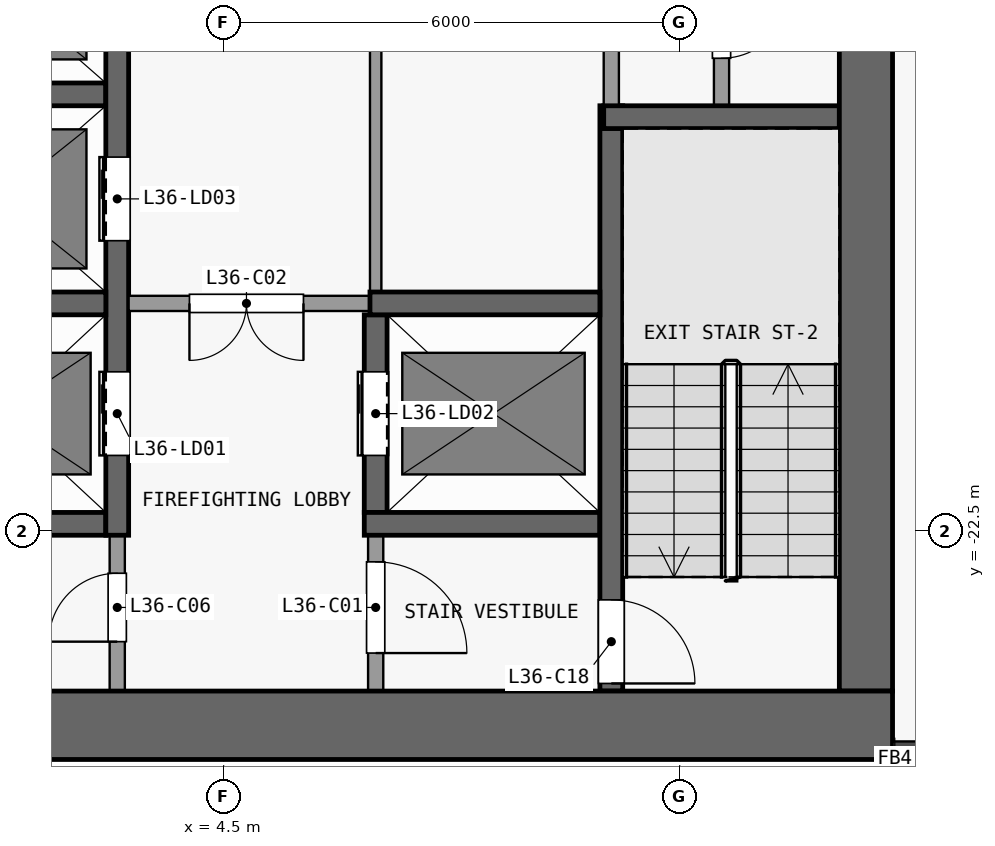
"""IFC4 building model, lengths in metres.
Left out: names, types, materials, properties, quantities, classifications, styles, units other than length and angle.
Written with IfcOpenShell. Run it as: python <this file> out.ifc"""

import sys

from ifc_helpers import new_model, si_unit, direction, frame, frame_2d, origin, place, context, subcontext, project, spatial, rectangle, extrude, element, fill, save


model = new_model("IFC4")
c1 = context("Model", 3, precision=1e-05, world=origin(), true_north=direction((0.0, 1.0)))
c2 = subcontext(c1, "Body", "Model", "MODEL_VIEW")
j1 = project(units=[si_unit("LENGTHUNIT", "METRE"), si_unit("PLANEANGLEUNIT", "RADIAN")], contexts=[c1])
p1 = place(None, origin())
s1 = spatial("IfcSite", under=j1, at=p1, CompositionType="ELEMENT")
p2 = place(p1, origin())
s2 = spatial("IfcBuilding", under=s1, at=p2, CompositionType="ELEMENT")
p3 = place(p2, frame((0.0, 0.0, 149.3)))
s3 = spatial("IfcBuildingStorey", under=s2, at=p3, CompositionType="ELEMENT", Elevation=149.3)
p4 = place(p3, frame((-13.3, -25.05, 0.0), z_axis=(0.0, 0.0, 1.0), x_axis=(1.0, 0.0, 0.0)))
e1 = element("IfcWall", 1, at=p4, inside=s3, PredefinedType="SHEAR", context=c2, shape_type="SweptSolid", body=[
    extrude(rectangle(XDim=26.6, YDim=0.9, at=frame_2d((13.3, 0.0))), origin(), (0.0, 0.0, 1.0), 3.3),
])
p5 = place(p3, frame((12.95, -24.6, 0.0), z_axis=(0.0, 0.0, 1.0), x_axis=(0.0, 1.0, 0.0)))
e2 = element("IfcWall", 2, at=p5, inside=s3, PredefinedType="SHEAR", context=c2, shape_type="SweptSolid", body=[
    extrude(rectangle(XDim=16.1, YDim=0.7, at=frame_2d((8.05, 0.0))), origin(), (0.0, 0.0, 1.0), 3.3),
])
p6 = place(p3, frame((-3.25, -22.4, 0.0), z_axis=(0.0, 0.0, 1.0), x_axis=(1.0, 0.0, 0.0)))
e3 = element("IfcWall", 3, at=p6, inside=s3, PredefinedType="SHEAR", context=c2, shape_type="SweptSolid", body=[
    extrude(rectangle(XDim=6.2, YDim=0.3, at=frame_2d((3.1, 0.0))), origin(), (0.0, 0.0, 1.0), 3.3),
])
p7 = place(p3, frame((6.35, -22.4, 0.0), z_axis=(0.0, 0.0, 1.0), x_axis=(1.0, 0.0, 0.0)))
e4 = element("IfcWall", 4, at=p7, inside=s3, PredefinedType="SHEAR", context=c2, shape_type="SweptSolid", body=[
    extrude(rectangle(XDim=3.1, YDim=0.3, at=frame_2d((1.55, 0.0))), origin(), (0.0, 0.0, 1.0), 3.3),
])
p8 = place(p3, frame((0.15, -19.5, 0.0), z_axis=(0.0, 0.0, 1.0), x_axis=(1.0, 0.0, 0.0)))
e5 = element("IfcWall", 5, at=p8, inside=s3, PredefinedType="SHEAR", context=c2, shape_type="SweptSolid", body=[
    extrude(rectangle(XDim=2.8, YDim=0.3, at=frame_2d((1.4, 0.0))), origin(), (0.0, 0.0, 1.0), 3.3),
])
p9 = place(p3, frame((6.575, -19.5, 0.0), z_axis=(0.0, 0.0, 1.0), x_axis=(-1.0, 0.0, 0.0)))
e6 = element("IfcWall", 6, at=p9, inside=s3, PredefinedType="PARTITIONING", context=c2, shape_type="SweptSolid", body=[
    extrude(rectangle(XDim=3.325, YDim=0.2, at=frame_2d((1.663, 0.0))), origin(), (0.0, 0.0, 1.0), 3.3),
])
p10 = place(p9, frame((1.025, 0.0, 0.0)))
e7 = element("IfcOpeningElement", 7, at=p10, cuts=e6, PredefinedType="OPENING", context=c2, shape_type="SweptSolid", body=[
    extrude(rectangle(XDim=1.5, YDim=2.1, at=frame_2d((0.75, 1.05))), frame((0.0, 0.11, 0.0), z_axis=(0.0, -1.0, 0.0), x_axis=(1.0, 0.0, 0.0)), (0.0, 0.0, 1.0), 0.22),
])
p11 = place(p3, frame((6.425, -19.5, 0.0), z_axis=(0.0, 0.0, 1.0), x_axis=(1.0, 0.0, 0.0)))
e8 = element("IfcWall", 8, at=p11, inside=s3, PredefinedType="SHEAR", context=c2, shape_type="SweptSolid", body=[
    extrude(rectangle(XDim=3.025, YDim=0.3, at=frame_2d((1.512, 0.0))), origin(), (0.0, 0.0, 1.0), 3.3),
])
p12 = place(p3, frame((9.5, -17.05, 0.0), z_axis=(0.0, 0.0, 1.0), x_axis=(1.0, 0.0, 0.0)))
e9 = element("IfcWall", 9, at=p12, inside=s3, PredefinedType="SHEAR", context=c2, shape_type="SweptSolid", body=[
    extrude(rectangle(XDim=3.1, YDim=0.3, at=frame_2d((1.55, 0.0))), origin(), (0.0, 0.0, 1.0), 3.3),
])
p13 = place(p3, frame((0.15, -16.75, 0.0), z_axis=(0.0, 0.0, 1.0), x_axis=(1.0, 0.0, 0.0)))
e10 = element("IfcWall", 10, at=p13, inside=s3, PredefinedType="SHEAR", context=c2, shape_type="SweptSolid", body=[
    extrude(rectangle(XDim=2.8, YDim=0.3, at=frame_2d((1.4, 0.0))), origin(), (0.0, 0.0, 1.0), 3.3),
])
p14 = place(p3, frame((3.1, -24.6, 0.0), z_axis=(0.0, 0.0, 1.0), x_axis=(0.0, 1.0, 0.0)))
e11 = element("IfcWall", 11, at=p14, inside=s3, PredefinedType="PARTITIONING", context=c2, shape_type="SweptSolid", body=[
    extrude(rectangle(XDim=2.05, YDim=0.2, at=frame_2d((1.025, 0.0))), origin(), (0.0, 0.0, 1.0), 3.3),
])
p15 = place(p14, frame((0.65, 0.0, 0.0)))
e12 = element("IfcOpeningElement", 12, at=p15, cuts=e11, PredefinedType="OPENING", context=c2, shape_type="SweptSolid", body=[
    extrude(rectangle(XDim=0.9, YDim=2.1, at=frame_2d((0.45, 1.05))), frame((0.0, 0.11, 0.0), z_axis=(0.0, -1.0, 0.0), x_axis=(1.0, 0.0, 0.0)), (0.0, 0.0, 1.0), 0.22),
])
p16 = place(p3, frame((3.1, -22.55, 0.0), z_axis=(0.0, 0.0, 1.0), x_axis=(0.0, 1.0, 0.0)))
e13 = element("IfcWall", 13, at=p16, inside=s3, PredefinedType="SHEAR", context=c2, shape_type="SweptSolid", body=[
    extrude(rectangle(XDim=14.05, YDim=0.3, at=frame_2d((7.025, 0.0))), origin(), (0.0, 0.0, 1.0), 3.3),
])
p17 = place(p16, frame((1.05, 0.0, 0.0)))
e14 = element("IfcOpeningElement", 14, at=p17, cuts=e13, PredefinedType="OPENING", context=c2, shape_type="SweptSolid", body=[
    extrude(rectangle(XDim=1.1, YDim=2.1, at=frame_2d((0.55, 1.05))), frame((0.0, 0.16, 0.0), z_axis=(0.0, -1.0, 0.0), x_axis=(1.0, 0.0, 0.0)), (0.0, 0.0, 1.0), 0.32),
])
p18 = place(p16, frame((3.875, 0.0, 0.0)))
e15 = element("IfcOpeningElement", 15, at=p18, cuts=e13, PredefinedType="OPENING", context=c2, shape_type="SweptSolid", body=[
    extrude(rectangle(XDim=1.1, YDim=2.1, at=frame_2d((0.55, 1.05))), frame((0.0, 0.16, 0.0), z_axis=(0.0, -1.0, 0.0), x_axis=(1.0, 0.0, 0.0)), (0.0, 0.0, 1.0), 0.32),
])
p19 = place(p16, frame((6.625, 0.0, 0.0)))
e16 = element("IfcOpeningElement", 16, at=p19, cuts=e13, PredefinedType="OPENING", context=c2, shape_type="SweptSolid", body=[
    extrude(rectangle(XDim=1.1, YDim=2.1, at=frame_2d((0.55, 1.05))), frame((0.0, 0.16, 0.0), z_axis=(0.0, -1.0, 0.0), x_axis=(1.0, 0.0, 0.0)), (0.0, 0.0, 1.0), 0.32),
])
p20 = place(p16, frame((9.375, 0.0, 0.0)))
e17 = element("IfcOpeningElement", 17, at=p20, cuts=e13, PredefinedType="OPENING", context=c2, shape_type="SweptSolid", body=[
    extrude(rectangle(XDim=1.1, YDim=2.1, at=frame_2d((0.55, 1.05))), frame((0.0, 0.16, 0.0), z_axis=(0.0, -1.0, 0.0), x_axis=(1.0, 0.0, 0.0)), (0.0, 0.0, 1.0), 0.32),
])
p21 = place(p16, frame((12.125, 0.0, 0.0)))
e18 = element("IfcOpeningElement", 18, at=p21, cuts=e13, PredefinedType="OPENING", context=c2, shape_type="SweptSolid", body=[
    extrude(rectangle(XDim=1.1, YDim=2.1, at=frame_2d((0.55, 1.05))), frame((0.0, 0.16, 0.0), z_axis=(0.0, -1.0, 0.0), x_axis=(1.0, 0.0, 0.0)), (0.0, 0.0, 1.0), 0.32),
])
p22 = place(p3, frame((6.5, -22.55, 0.0), z_axis=(0.0, 0.0, 1.0), x_axis=(0.0, -1.0, 0.0)))
e19 = element("IfcWall", 19, at=p22, inside=s3, PredefinedType="PARTITIONING", context=c2, shape_type="SweptSolid", body=[
    extrude(rectangle(XDim=2.05, YDim=0.2, at=frame_2d((1.025, 0.0))), origin(), (0.0, 0.0, 1.0), 3.3),
])
p23 = place(p22, frame((0.35, 0.0, 0.0)))
e20 = element("IfcOpeningElement", 20, at=p23, cuts=e19, PredefinedType="OPENING", context=c2, shape_type="SweptSolid", body=[
    extrude(rectangle(XDim=1.2, YDim=2.1, at=frame_2d((0.6, 1.05))), frame((0.0, 0.11, 0.0), z_axis=(0.0, -1.0, 0.0), x_axis=(1.0, 0.0, 0.0)), (0.0, 0.0, 1.0), 0.22),
])
p24 = place(p3, frame((6.5, -22.25, 0.0), z_axis=(0.0, 0.0, 1.0), x_axis=(0.0, 1.0, 0.0)))
e21 = element("IfcWall", 21, at=p24, inside=s3, PredefinedType="SHEAR", context=c2, shape_type="SweptSolid", body=[
    extrude(rectangle(XDim=2.6, YDim=0.3, at=frame_2d((1.3, 0.0))), origin(), (0.0, 0.0, 1.0), 3.3),
])
p25 = place(p24, frame((0.75, 0.0, 0.0)))
e22 = element("IfcOpeningElement", 22, at=p25, cuts=e21, PredefinedType="OPENING", context=c2, shape_type="SweptSolid", body=[
    extrude(rectangle(XDim=1.1, YDim=2.1, at=frame_2d((0.55, 1.05))), frame((0.0, 0.16, 0.0), z_axis=(0.0, -1.0, 0.0), x_axis=(1.0, 0.0, 0.0)), (0.0, 0.0, 1.0), 0.32),
])
p26 = place(p3, frame((6.5, -11.35, 0.0), z_axis=(0.0, 0.0, 1.0), x_axis=(0.0, -1.0, 0.0)))
e23 = element("IfcWall", 23, at=p26, inside=s3, PredefinedType="PARTITIONING", context=c2, shape_type="SweptSolid", body=[
    extrude(rectangle(XDim=8.0, YDim=0.15, at=frame_2d((4.0, 0.0))), origin(), (0.0, 0.0, 1.0), 3.3),
])
p27 = place(p26, frame((3.425, 0.0, 0.0)))
e24 = element("IfcOpeningElement", 24, at=p27, cuts=e23, PredefinedType="OPENING", context=c2, shape_type="SweptSolid", body=[
    extrude(rectangle(XDim=1.2, YDim=2.1, at=frame_2d((0.6, 1.05))), frame((0.0, 0.085, 0.0), z_axis=(0.0, -1.0, 0.0), x_axis=(1.0, 0.0, 0.0)), (0.0, 0.0, 1.0), 0.17),
])
p28 = place(p3, frame((9.6, -16.9, 0.0), z_axis=(0.0, 0.0, 1.0), x_axis=(0.0, -1.0, 0.0)))
e25 = element("IfcWall", 25, at=p28, inside=s3, PredefinedType="SHEAR", context=c2, shape_type="SweptSolid", body=[
    extrude(rectangle(XDim=7.7, YDim=0.3, at=frame_2d((3.85, 0.0))), origin(), (0.0, 0.0, 1.0), 3.3),
])
p29 = place(p28, frame((6.5, 0.0, 0.0)))
e26 = element("IfcOpeningElement", 26, at=p29, cuts=e25, PredefinedType="OPENING", context=c2, shape_type="SweptSolid", body=[
    extrude(rectangle(XDim=1.1, YDim=2.1, at=frame_2d((0.55, 1.05))), frame((0.0, 0.16, 0.0), z_axis=(0.0, -1.0, 0.0), x_axis=(1.0, 0.0, 0.0)), (0.0, 0.0, 1.0), 0.32),
])
p30 = place(p3, frame((9.6, -16.9, 0.0), z_axis=(0.0, 0.0, 1.0), x_axis=(0.0, 1.0, 0.0)))
e27 = element("IfcWall", 27, at=p30, inside=s3, PredefinedType="PARTITIONING", context=c2, shape_type="SweptSolid", body=[
    extrude(rectangle(XDim=5.75, YDim=0.2, at=frame_2d((2.875, 0.0))), origin(), (0.0, 0.0, 1.0), 3.3),
])
p31 = place(p3, frame((11.05, -14.5, 0.0), z_axis=(0.0, 0.0, 1.0), x_axis=(0.0, -1.0, 0.0)))
e28 = element("IfcWall", 28, at=p31, inside=s3, PredefinedType="PARTITIONING", context=c2, shape_type="SweptSolid", body=[
    extrude(rectangle(XDim=2.4, YDim=0.2, at=frame_2d((1.2, 0.0))), origin(), (0.0, 0.0, 1.0), 3.3),
])
p32 = place(p31, frame((0.875, 0.0, 0.0)))
e29 = element("IfcOpeningElement", 29, at=p32, cuts=e28, PredefinedType="OPENING", context=c2, shape_type="SweptSolid", body=[
    extrude(rectangle(XDim=0.9, YDim=2.1, at=frame_2d((0.45, 1.05))), frame((0.0, 0.11, 0.0), z_axis=(0.0, -1.0, 0.0), x_axis=(1.0, 0.0, 0.0)), (0.0, 0.0, 1.0), 0.22),
])
p33 = place(p17, origin())
e30 = element("IfcDoor", 30, at=p33, inside=s3, OperationType="DOUBLE_DOOR_SLIDING", PredefinedType="DOOR", context=c2, shape_type="SweptSolid", body=[
    extrude(rectangle(XDim=1.1, YDim=2.1, at=frame_2d((0.55, 1.05))), frame((0.0, 0.025, 0.0), z_axis=(0.0, -1.0, 0.0), x_axis=(1.0, 0.0, 0.0)), (0.0, 0.0, 1.0), 0.05),
])
fill(e14, e30)
p34 = place(p25, origin())
e31 = element("IfcDoor", 31, at=p34, inside=s3, OperationType="DOUBLE_DOOR_SLIDING", PredefinedType="DOOR", context=c2, shape_type="SweptSolid", body=[
    extrude(rectangle(XDim=1.1, YDim=2.1, at=frame_2d((0.55, 1.05))), frame((0.0, 0.025, 0.0), z_axis=(0.0, -1.0, 0.0), x_axis=(1.0, 0.0, 0.0)), (0.0, 0.0, 1.0), 0.05),
])
fill(e22, e31)
p35 = place(p18, origin())
e32 = element("IfcDoor", 32, at=p35, inside=s3, OperationType="DOUBLE_DOOR_SLIDING", PredefinedType="DOOR", context=c2, shape_type="SweptSolid", body=[
    extrude(rectangle(XDim=1.1, YDim=2.1, at=frame_2d((0.55, 1.05))), frame((0.0, 0.025, 0.0), z_axis=(0.0, -1.0, 0.0), x_axis=(1.0, 0.0, 0.0)), (0.0, 0.0, 1.0), 0.05),
])
fill(e15, e32)
p36 = place(p23, origin())
e33 = element("IfcDoor", 33, at=p36, inside=s3, OperationType="SINGLE_SWING_RIGHT", PredefinedType="DOOR", context=c2, shape_type="SweptSolid", body=[
    extrude(rectangle(XDim=1.2, YDim=2.1, at=frame_2d((0.6, 1.05))), frame((0.0, 0.025, 0.0), z_axis=(0.0, -1.0, 0.0), x_axis=(1.0, 0.0, 0.0)), (0.0, 0.0, 1.0), 0.05),
])
fill(e20, e33)
p37 = place(p10, origin())
e34 = element("IfcDoor", 34, at=p37, inside=s3, OperationType="DOUBLE_DOOR_SINGLE_SWING", PredefinedType="DOOR", context=c2, shape_type="SweptSolid", body=[
    extrude(rectangle(XDim=1.5, YDim=2.1, at=frame_2d((0.75, 1.05))), frame((0.0, 0.025, 0.0), z_axis=(0.0, -1.0, 0.0), x_axis=(1.0, 0.0, 0.0)), (0.0, 0.0, 1.0), 0.05),
])
fill(e7, e34)
p38 = place(p15, origin())
e35 = element("IfcDoor", 35, at=p38, inside=s3, OperationType="SINGLE_SWING_LEFT", PredefinedType="DOOR", context=c2, shape_type="SweptSolid", body=[
    extrude(rectangle(XDim=0.9, YDim=2.1, at=frame_2d((0.45, 1.05))), frame((0.0, 0.025, 0.0), z_axis=(0.0, -1.0, 0.0), x_axis=(1.0, 0.0, 0.0)), (0.0, 0.0, 1.0), 0.05),
])
fill(e12, e35)
p39 = place(p32, origin())
e36 = element("IfcDoor", 36, at=p39, inside=s3, OperationType="SINGLE_SWING_LEFT", PredefinedType="DOOR", context=c2, shape_type="SweptSolid", body=[
    extrude(rectangle(XDim=0.9, YDim=2.1, at=frame_2d((0.45, 1.05))), frame((0.0, 0.025, 0.0), z_axis=(0.0, -1.0, 0.0), x_axis=(1.0, 0.0, 0.0)), (0.0, 0.0, 1.0), 0.05),
])
fill(e29, e36)
p40 = place(p29, origin())
e37 = element("IfcDoor", 37, at=p40, inside=s3, OperationType="SINGLE_SWING_RIGHT", PredefinedType="DOOR", context=c2, shape_type="SweptSolid", body=[
    extrude(rectangle(XDim=1.1, YDim=2.1, at=frame_2d((0.55, 1.05))), frame((0.0, 0.025, 0.0), z_axis=(0.0, -1.0, 0.0), x_axis=(1.0, 0.0, 0.0)), (0.0, 0.0, 1.0), 0.05),
])
fill(e26, e37)
save(model, sys.argv[1])
